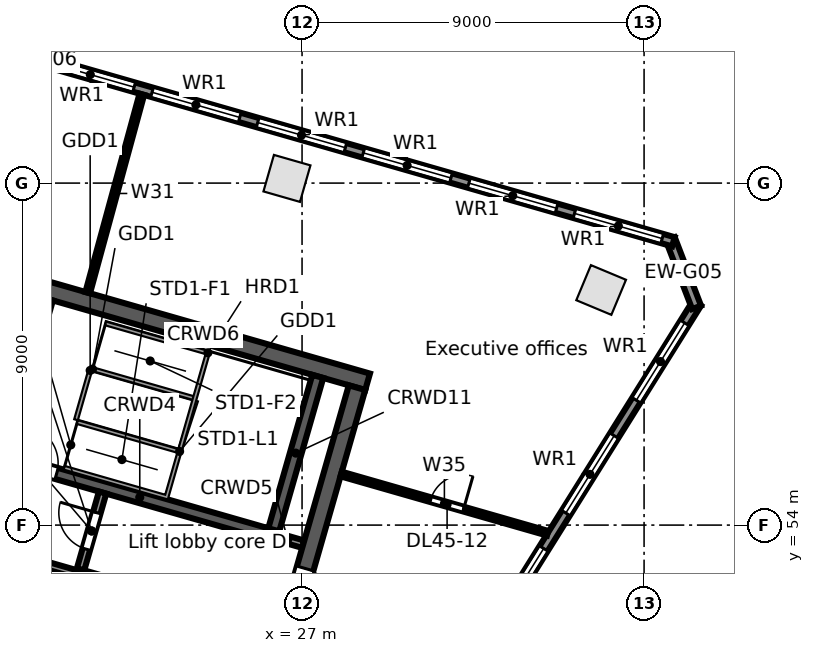
"""IFC4 building model, lengths in metres.
Left out: names, types, materials, properties, quantities, classifications, styles, units other than length and angle.
Written with IfcOpenShell. Run it as: python <this file> out.ifc"""

import sys

from ifc_helpers import new_model, si_unit, direction, frame, frame_2d, origin, origin_2d, place, context, subcontext, project, spatial, rectangle, extrude, element, fill, save


model = new_model("IFC4")
c1 = context("Model", 3, precision=1e-05, world=origin(), true_north=direction((0.0, 1.0)))
c2 = subcontext(c1, "Body", "Model", "MODEL_VIEW")
j1 = project(units=[si_unit("LENGTHUNIT", "METRE"), si_unit("PLANEANGLEUNIT", "RADIAN")], contexts=[c1])
p1 = place(None, origin())
s1 = spatial("IfcSite", under=j1, at=p1, CompositionType="ELEMENT")
p2 = place(p1, origin())
s2 = spatial("IfcBuilding", under=s1, at=p2, CompositionType="ELEMENT")
p3 = place(p2, frame((0.0, 0.0, 211.4)))
s3 = spatial("IfcBuildingStorey", under=s2, at=p3, CompositionType="ELEMENT", Elevation=211.4)
for number, where, z_axis, x_axis in (
    (1, (26.603, 63.124, 0.0), (0.0, 0.0, 1.0), (-0.961, 0.276, 0.0)),
    (2, (34.87, 60.187, 0.0), (0.0, 0.0, 1.0), (-0.923, 0.385, 0.0)),
):
    element("IfcColumn", number, at=place(p3, frame(where, z_axis=z_axis, x_axis=x_axis)), inside=s3, PredefinedType="COLUMN", context=c2, shape_type="SweptSolid", body=[
        extrude(rectangle(XDim=1.0, YDim=1.0, at=origin_2d()), origin(), (0.0, 0.0, 1.0), 3.9),
    ])
p4 = place(p3, frame((37.392, 59.84, 0.0), z_axis=(0.0, 0.0, 1.0), x_axis=(-0.529919909431, -0.848047692992, 0.0)))
e3 = element("IfcWall", 3, at=p4, inside=s3, PredefinedType="STANDARD", context=c2, shape_type="SweptSolid", body=[
    extrude(rectangle(XDim=21.104, YDim=0.25, at=frame_2d((10.552, 0.0))), origin(), (0.0, 0.0, 1.0), 3.62),
])
p5 = place(p4, frame((18.112, 0.0, 0.8)))
e4 = element("IfcOpeningElement", 4, at=p5, cuts=e3, PredefinedType="OPENING", context=c2, shape_type="SweptSolid", body=[
    extrude(rectangle(XDim=2.4, YDim=2.2, at=frame_2d((1.2, 1.1))), frame((0.0, 0.135, 0.0), z_axis=(0.0, -1.0, 0.0), x_axis=(1.0, 0.0, 0.0)), (0.0, 0.0, 1.0), 0.27),
])
p6 = place(p4, frame((14.612, 0.0, 0.8)))
e5 = element("IfcOpeningElement", 5, at=p6, cuts=e3, PredefinedType="OPENING", context=c2, shape_type="SweptSolid", body=[
    extrude(rectangle(XDim=2.4, YDim=2.2, at=frame_2d((1.2, 1.1))), frame((0.0, 0.135, 0.0), z_axis=(0.0, -1.0, 0.0), x_axis=(1.0, 0.0, 0.0)), (0.0, 0.0, 1.0), 0.27),
])
p7 = place(p4, frame((11.112, 0.0, 0.8)))
e6 = element("IfcOpeningElement", 6, at=p7, cuts=e3, PredefinedType="OPENING", context=c2, shape_type="SweptSolid", body=[
    extrude(rectangle(XDim=2.4, YDim=2.2, at=frame_2d((1.2, 1.1))), frame((0.0, 0.135, 0.0), z_axis=(0.0, -1.0, 0.0), x_axis=(1.0, 0.0, 0.0)), (0.0, 0.0, 1.0), 0.27),
])
p8 = place(p4, frame((7.612, 0.0, 0.8)))
e7 = element("IfcOpeningElement", 7, at=p8, cuts=e3, PredefinedType="OPENING", context=c2, shape_type="SweptSolid", body=[
    extrude(rectangle(XDim=2.4, YDim=2.2, at=frame_2d((1.2, 1.1))), frame((0.0, 0.135, 0.0), z_axis=(0.0, -1.0, 0.0), x_axis=(1.0, 0.0, 0.0)), (0.0, 0.0, 1.0), 0.27),
])
p9 = place(p4, frame((4.112, 0.0, 0.8)))
e8 = element("IfcOpeningElement", 8, at=p9, cuts=e3, PredefinedType="OPENING", context=c2, shape_type="SweptSolid", body=[
    extrude(rectangle(XDim=2.4, YDim=2.2, at=frame_2d((1.2, 1.1))), frame((0.0, 0.135, 0.0), z_axis=(0.0, -1.0, 0.0), x_axis=(1.0, 0.0, 0.0)), (0.0, 0.0, 1.0), 0.27),
])
p10 = place(p4, frame((0.612, 0.0, 0.8)))
e9 = element("IfcOpeningElement", 9, at=p10, cuts=e3, PredefinedType="OPENING", context=c2, shape_type="SweptSolid", body=[
    extrude(rectangle(XDim=2.4, YDim=2.2, at=frame_2d((1.2, 1.1))), frame((0.0, 0.135, 0.0), z_axis=(0.0, -1.0, 0.0), x_axis=(1.0, 0.0, 0.0)), (0.0, 0.0, 1.0), 0.27),
])
p11 = place(p3, frame((36.69, 61.531, 0.0), z_axis=(0.0, 0.0, 1.0), x_axis=(0.358377147136, -0.933576895821, 0.0)))
e10 = element("IfcWall", 10, at=p11, inside=s3, PredefinedType="STANDARD", context=c2, shape_type="SweptSolid", body=[
    extrude(rectangle(XDim=1.93, YDim=0.25, at=frame_2d((0.965, 0.0))), origin(), (0.0, 0.0, 1.0), 3.62),
])
p12 = place(p3, frame((3.34, 71.042, 0.0), z_axis=(0.0, 0.0, 1.0), x_axis=(0.96126179431, -0.275637012753, 0.0)))
e11 = element("IfcWall", 11, at=p12, inside=s3, PredefinedType="STANDARD", context=c2, shape_type="SweptSolid", body=[
    extrude(rectangle(XDim=34.779, YDim=0.25, at=frame_2d((17.39, 0.0))), origin(), (0.0, 0.0, 1.0), 3.62),
])
p13 = place(p12, frame((32.071, 0.0, 0.8)))
e12 = element("IfcOpeningElement", 12, at=p13, cuts=e11, PredefinedType="OPENING", context=c2, shape_type="SweptSolid", body=[
    extrude(rectangle(XDim=2.4, YDim=2.2, at=frame_2d((1.2, 1.1))), frame((0.0, 0.135, 0.0), z_axis=(0.0, -1.0, 0.0), x_axis=(1.0, 0.0, 0.0)), (0.0, 0.0, 1.0), 0.27),
])
p14 = place(p12, frame((29.18, 0.0, 0.8)))
e13 = element("IfcOpeningElement", 13, at=p14, cuts=e11, PredefinedType="OPENING", context=c2, shape_type="SweptSolid", body=[
    extrude(rectangle(XDim=2.4, YDim=2.2, at=frame_2d((1.2, 1.1))), frame((0.0, 0.135, 0.0), z_axis=(0.0, -1.0, 0.0), x_axis=(1.0, 0.0, 0.0)), (0.0, 0.0, 1.0), 0.27),
])
p15 = place(p12, frame((26.289, 0.0, 0.8)))
e14 = element("IfcOpeningElement", 14, at=p15, cuts=e11, PredefinedType="OPENING", context=c2, shape_type="SweptSolid", body=[
    extrude(rectangle(XDim=2.4, YDim=2.2, at=frame_2d((1.2, 1.1))), frame((0.0, 0.135, 0.0), z_axis=(0.0, -1.0, 0.0), x_axis=(1.0, 0.0, 0.0)), (0.0, 0.0, 1.0), 0.27),
])
p16 = place(p12, frame((23.398, 0.0, 0.8)))
e15 = element("IfcOpeningElement", 15, at=p16, cuts=e11, PredefinedType="OPENING", context=c2, shape_type="SweptSolid", body=[
    extrude(rectangle(XDim=2.4, YDim=2.2, at=frame_2d((1.2, 1.1))), frame((0.0, 0.135, 0.0), z_axis=(0.0, -1.0, 0.0), x_axis=(1.0, 0.0, 0.0)), (0.0, 0.0, 1.0), 0.27),
])
p17 = place(p12, frame((20.508, 0.0, 0.8)))
e16 = element("IfcOpeningElement", 16, at=p17, cuts=e11, PredefinedType="OPENING", context=c2, shape_type="SweptSolid", body=[
    extrude(rectangle(XDim=2.4, YDim=2.2, at=frame_2d((1.2, 1.1))), frame((0.0, 0.135, 0.0), z_axis=(0.0, -1.0, 0.0), x_axis=(1.0, 0.0, 0.0)), (0.0, 0.0, 1.0), 0.27),
])
p18 = place(p12, frame((17.616, 0.0, 0.8)))
e17 = element("IfcOpeningElement", 17, at=p18, cuts=e11, PredefinedType="OPENING", context=c2, shape_type="SweptSolid", body=[
    extrude(rectangle(XDim=2.4, YDim=2.2, at=frame_2d((1.2, 1.1))), frame((0.0, 0.135, 0.0), z_axis=(0.0, -1.0, 0.0), x_axis=(1.0, 0.0, 0.0)), (0.0, 0.0, 1.0), 0.27),
])
p19 = place(p12, frame((14.726, 0.0, 0.8)))
e18 = element("IfcOpeningElement", 18, at=p19, cuts=e11, PredefinedType="OPENING", context=c2, shape_type="SweptSolid", body=[
    extrude(rectangle(XDim=2.4, YDim=2.2, at=frame_2d((1.2, 1.1))), frame((0.0, 0.135, 0.0), z_axis=(0.0, -1.0, 0.0), x_axis=(1.0, 0.0, 0.0)), (0.0, 0.0, 1.0), 0.27),
])
p20 = place(p12, frame((11.834, 0.0, 0.8)))
e19 = element("IfcOpeningElement", 19, at=p20, cuts=e11, PredefinedType="OPENING", context=c2, shape_type="SweptSolid", body=[
    extrude(rectangle(XDim=2.4, YDim=2.2, at=frame_2d((1.2, 1.1))), frame((0.0, 0.135, 0.0), z_axis=(0.0, -1.0, 0.0), x_axis=(1.0, 0.0, 0.0)), (0.0, 0.0, 1.0), 0.27),
])
p21 = place(p12, frame((8.944, 0.0, 0.8)))
e20 = element("IfcOpeningElement", 20, at=p21, cuts=e11, PredefinedType="OPENING", context=c2, shape_type="SweptSolid", body=[
    extrude(rectangle(XDim=2.4, YDim=2.2, at=frame_2d((1.2, 1.1))), frame((0.0, 0.135, 0.0), z_axis=(0.0, -1.0, 0.0), x_axis=(1.0, 0.0, 0.0)), (0.0, 0.0, 1.0), 0.27),
])
p22 = place(p12, frame((6.052, 0.0, 0.8)))
e21 = element("IfcOpeningElement", 21, at=p22, cuts=e11, PredefinedType="OPENING", context=c2, shape_type="SweptSolid", body=[
    extrude(rectangle(XDim=2.4, YDim=2.2, at=frame_2d((1.2, 1.1))), frame((0.0, 0.135, 0.0), z_axis=(0.0, -1.0, 0.0), x_axis=(1.0, 0.0, 0.0)), (0.0, 0.0, 1.0), 0.27),
])
p23 = place(p12, frame((3.162, 0.0, 0.8)))
e22 = element("IfcOpeningElement", 22, at=p23, cuts=e11, PredefinedType="OPENING", context=c2, shape_type="SweptSolid", body=[
    extrude(rectangle(XDim=2.4, YDim=2.2, at=frame_2d((1.2, 1.1))), frame((0.0, 0.135, 0.0), z_axis=(0.0, -1.0, 0.0), x_axis=(1.0, 0.0, 0.0)), (0.0, 0.0, 1.0), 0.27),
])
p24 = place(p12, frame((0.271, 0.0, 0.8)))
e23 = element("IfcOpeningElement", 23, at=p24, cuts=e11, PredefinedType="OPENING", context=c2, shape_type="SweptSolid", body=[
    extrude(rectangle(XDim=2.4, YDim=2.2, at=frame_2d((1.2, 1.1))), frame((0.0, 0.135, 0.0), z_axis=(0.0, -1.0, 0.0), x_axis=(1.0, 0.0, 0.0)), (0.0, 0.0, 1.0), 0.27),
])
p25 = place(p3, frame((18.583, 53.423, 0.0), z_axis=(0.0, 0.0, 1.0), x_axis=(0.961259287968, -0.275645753268, 0.0)))
e24 = element("IfcWall", 24, at=p25, inside=s3, PredefinedType="SOLIDWALL", context=c2, shape_type="SweptSolid", body=[
    extrude(rectangle(XDim=2.65, YDim=0.2, at=frame_2d((1.325, 0.0))), origin(), (0.0, 0.0, 1.0), 3.62),
])
p26 = place(p3, frame((21.131, 52.692, 0.0), z_axis=(0.0, 0.0, 1.0), x_axis=(0.961261488075, -0.275638080722, 0.0)))
e25 = element("IfcWall", 25, at=p26, inside=s3, PredefinedType="SOLIDWALL", context=c2, shape_type="SweptSolid", body=[
    extrude(rectangle(XDim=5.45, YDim=0.3, at=frame_2d((2.725, 0.0))), origin(), (0.0, 0.0, 1.0), 3.62),
])
p27 = place(p26, frame((2.35, 0.0, 0.0)))
e26 = element("IfcOpeningElement", 26, at=p27, cuts=e25, PredefinedType="OPENING", context=c2, shape_type="SweptSolid", body=[
    extrude(rectangle(XDim=0.9, YDim=2.1, at=frame_2d((0.45, 1.05))), frame((0.0, 0.16, 0.0), z_axis=(0.0, -1.0, 0.0), x_axis=(1.0, 0.0, 0.0)), (0.0, 0.0, 1.0), 0.32),
])
p28 = place(p3, frame((19.245, 55.73, 0.0), z_axis=(0.0, 0.0, 1.0), x_axis=(0.961263007877, -0.275632780503, 0.0)))
e27 = element("IfcWall", 27, at=p28, inside=s3, PredefinedType="SOLIDWALL", context=c2, shape_type="SweptSolid", body=[
    extrude(rectangle(XDim=7.25, YDim=0.3, at=frame_2d((3.625, 0.0))), origin(), (0.0, 0.0, 1.0), 3.62),
])
p29 = place(p28, frame((0.35, 0.0, 0.0)))
e28 = element("IfcOpeningElement", 28, at=p29, cuts=e27, PredefinedType="OPENING", context=c2, shape_type="SweptSolid", body=[
    extrude(rectangle(XDim=1.0, YDim=2.1, at=frame_2d((0.5, 1.05))), frame((0.0, 0.16, 0.0), z_axis=(0.0, -1.0, 0.0), x_axis=(1.0, 0.0, 0.0)), (0.0, 0.0, 1.0), 0.32),
])
p30 = place(p3, frame((26.214, 53.732, 0.0), z_axis=(0.0, 0.0, 1.0), x_axis=(0.961241665642, -0.275707200184, 0.0)))
e29 = element("IfcWall", 29, at=p30, inside=s3, PredefinedType="SOLIDWALL", context=c2, shape_type="SweptSolid", body=[
    extrude(rectangle(XDim=0.85, YDim=0.2, at=frame_2d((0.425, 0.0))), origin(), (0.0, 0.0, 1.0), 3.62),
])
p31 = place(p3, frame((20.073, 60.252, 0.0), z_axis=(0.0, 0.0, 1.0), x_axis=(0.96126248289, -0.275634611374, 0.0)))
e30 = element("IfcWall", 30, at=p31, inside=s3, PredefinedType="SOLIDWALL", context=c2, shape_type="SweptSolid", body=[
    extrude(rectangle(XDim=9.0, YDim=0.45, at=frame_2d((4.5, 0.0))), origin(), (0.0, 0.0, 1.0), 3.62),
])
p32 = place(p3, frame((17.168, 49.303, 0.0), z_axis=(0.0, 0.0, 1.0), x_axis=(0.275638974822, 0.961261231695, 0.0)))
e31 = element("IfcWall", 31, at=p32, inside=s3, PredefinedType="SOLIDWALL", context=c2, shape_type="SweptSolid", body=[
    extrude(rectangle(XDim=11.1, YDim=0.45, at=frame_2d((5.55, 0.0))), origin(), (0.0, 0.0, 1.0), 3.62),
])
p33 = place(p32, frame((4.95, 0.0, 0.0)))
e32 = element("IfcOpeningElement", 32, at=p33, cuts=e31, PredefinedType="OPENING", context=c2, shape_type="SweptSolid", body=[
    extrude(rectangle(XDim=1.2, YDim=2.1, at=frame_2d((0.6, 1.05))), frame((0.0, 0.235, 0.0), z_axis=(0.0, -1.0, 0.0), x_axis=(1.0, 0.0, 0.0)), (0.0, 0.0, 1.0), 0.47),
])
p34 = place(p3, frame((21.172, 52.837, 0.0), z_axis=(0.0, 0.0, 1.0), x_axis=(0.275657676022, 0.961255868981, 0.0)))
e33 = element("IfcWall", 33, at=p34, inside=s3, PredefinedType="PARTITIONING", context=c2, shape_type="SweptSolid", body=[
    extrude(rectangle(XDim=2.1, YDim=0.2, at=frame_2d((1.05, 0.0))), origin(), (0.0, 0.0, 1.0), 3.62),
])
p35 = place(p34, frame((0.55, 0.0, 0.0)))
e34 = element("IfcOpeningElement", 34, at=p35, cuts=e33, PredefinedType="OPENING", context=c2, shape_type="SweptSolid", body=[
    extrude(rectangle(XDim=1.0, YDim=2.1, at=frame_2d((0.5, 1.05))), frame((0.0, 0.11, 0.0), z_axis=(0.0, -1.0, 0.0), x_axis=(1.0, 0.0, 0.0)), (0.0, 0.0, 1.0), 0.22),
])
p36 = place(p3, frame((26.256, 53.876, 0.0), z_axis=(0.0, 0.0, 1.0), x_axis=(0.275588560745, 0.96127568636, 0.0)))
e35 = element("IfcWall", 35, at=p36, inside=s3, PredefinedType="SOLIDWALL", context=c2, shape_type="SweptSolid", body=[
    extrude(rectangle(XDim=4.2, YDim=0.3, at=frame_2d((2.1, 0.0))), origin(), (0.0, 0.0, 1.0), 3.62),
])
p37 = place(p3, frame((25.387, 46.947, 0.0), z_axis=(0.0, 0.0, 1.0), x_axis=(0.275638974822, 0.961261231695, 0.0)))
e36 = element("IfcWall", 36, at=p37, inside=s3, PredefinedType="SOLIDWALL", context=c2, shape_type="SweptSolid", body=[
    extrude(rectangle(XDim=11.1, YDim=0.45, at=frame_2d((5.55, 0.0))), origin(), (0.0, 0.0, 1.0), 3.62),
])
p38 = place(p37, frame((4.95, 0.0, 0.0)))
e37 = element("IfcOpeningElement", 37, at=p38, cuts=e36, PredefinedType="OPENING", context=c2, shape_type="SweptSolid", body=[
    extrude(rectangle(XDim=1.2, YDim=2.1, at=frame_2d((0.6, 1.05))), frame((0.0, 0.235, 0.0), z_axis=(0.0, -1.0, 0.0), x_axis=(1.0, 0.0, 0.0)), (0.0, 0.0, 1.0), 0.47),
])
p39 = place(p3, frame((21.36, 60.117, 0.0), z_axis=(0.0, 0.0, 1.0), x_axis=(0.263151767798, 0.964754449124, 0.0)))
e38 = element("IfcWall", 38, at=p39, inside=s3, PredefinedType="PARTITIONING", context=c2, shape_type="SweptSolid", body=[
    extrude(rectangle(XDim=5.411, YDim=0.125, at=frame_2d((2.705, 0.0))), origin(), (0.0, 0.0, 1.0), 3.0),
])
p40 = place(p3, frame((28.029, 55.344, 0.0), z_axis=(0.0, 0.0, 1.0), x_axis=(0.961249621014, -0.275679462603, 0.0)))
e39 = element("IfcWall", 39, at=p40, inside=s3, PredefinedType="PARTITIONING", context=c2, shape_type="SweptSolid", body=[
    extrude(rectangle(XDim=5.652, YDim=0.125, at=frame_2d((2.826, 0.0))), origin(), (0.0, 0.0, 1.0), 2.988),
])
p41 = place(p40, frame((2.45, 0.0, 0.0)))
e40 = element("IfcOpeningElement", 40, at=p41, cuts=e39, PredefinedType="OPENING", context=c2, shape_type="SweptSolid", body=[
    extrude(rectangle(XDim=0.9, YDim=2.1, at=frame_2d((0.45, 1.05))), frame((0.0, 0.073, 0.0), z_axis=(0.0, -1.0, 0.0), x_axis=(1.0, 0.0, 0.0)), (0.0, 0.0, 1.0), 0.145),
])
p42 = place(p8, origin())
e41 = element("IfcWindow", 41, at=p42, inside=s3, PartitioningType="SINGLE_PANEL", PredefinedType="WINDOW", context=c2, shape_type="SweptSolid", body=[
    extrude(rectangle(XDim=2.4, YDim=2.2, at=frame_2d((1.2, 1.1))), frame((0.0, 0.03, 0.0), z_axis=(0.0, -1.0, 0.0), x_axis=(1.0, 0.0, 0.0)), (0.0, 0.0, 1.0), 0.06),
])
fill(e7, e41)
p43 = place(p9, origin())
e42 = element("IfcWindow", 42, at=p43, inside=s3, PartitioningType="SINGLE_PANEL", PredefinedType="WINDOW", context=c2, shape_type="SweptSolid", body=[
    extrude(rectangle(XDim=2.4, YDim=2.2, at=frame_2d((1.2, 1.1))), frame((0.0, 0.03, 0.0), z_axis=(0.0, -1.0, 0.0), x_axis=(1.0, 0.0, 0.0)), (0.0, 0.0, 1.0), 0.06),
])
fill(e8, e42)
p44 = place(p10, origin())
e43 = element("IfcWindow", 43, at=p44, inside=s3, PartitioningType="SINGLE_PANEL", PredefinedType="WINDOW", context=c2, shape_type="SweptSolid", body=[
    extrude(rectangle(XDim=2.4, YDim=2.2, at=frame_2d((1.2, 1.1))), frame((0.0, 0.03, 0.0), z_axis=(0.0, -1.0, 0.0), x_axis=(1.0, 0.0, 0.0)), (0.0, 0.0, 1.0), 0.06),
])
fill(e9, e43)
p45 = place(p13, origin())
e44 = element("IfcWindow", 44, at=p45, inside=s3, PartitioningType="SINGLE_PANEL", PredefinedType="WINDOW", context=c2, shape_type="SweptSolid", body=[
    extrude(rectangle(XDim=2.4, YDim=2.2, at=frame_2d((1.2, 1.1))), frame((0.0, 0.03, 0.0), z_axis=(0.0, -1.0, 0.0), x_axis=(1.0, 0.0, 0.0)), (0.0, 0.0, 1.0), 0.06),
])
fill(e12, e44)
p46 = place(p14, origin())
e45 = element("IfcWindow", 45, at=p46, inside=s3, PartitioningType="SINGLE_PANEL", PredefinedType="WINDOW", context=c2, shape_type="SweptSolid", body=[
    extrude(rectangle(XDim=2.4, YDim=2.2, at=frame_2d((1.2, 1.1))), frame((0.0, 0.03, 0.0), z_axis=(0.0, -1.0, 0.0), x_axis=(1.0, 0.0, 0.0)), (0.0, 0.0, 1.0), 0.06),
])
fill(e13, e45)
p47 = place(p15, origin())
e46 = element("IfcWindow", 46, at=p47, inside=s3, PartitioningType="SINGLE_PANEL", PredefinedType="WINDOW", context=c2, shape_type="SweptSolid", body=[
    extrude(rectangle(XDim=2.4, YDim=2.2, at=frame_2d((1.2, 1.1))), frame((0.0, 0.03, 0.0), z_axis=(0.0, -1.0, 0.0), x_axis=(1.0, 0.0, 0.0)), (0.0, 0.0, 1.0), 0.06),
])
fill(e14, e46)
p48 = place(p16, origin())
e47 = element("IfcWindow", 47, at=p48, inside=s3, PartitioningType="SINGLE_PANEL", PredefinedType="WINDOW", context=c2, shape_type="SweptSolid", body=[
    extrude(rectangle(XDim=2.4, YDim=2.2, at=frame_2d((1.2, 1.1))), frame((0.0, 0.03, 0.0), z_axis=(0.0, -1.0, 0.0), x_axis=(1.0, 0.0, 0.0)), (0.0, 0.0, 1.0), 0.06),
])
fill(e15, e47)
p49 = place(p17, origin())
e48 = element("IfcWindow", 48, at=p49, inside=s3, PartitioningType="SINGLE_PANEL", PredefinedType="WINDOW", context=c2, shape_type="SweptSolid", body=[
    extrude(rectangle(XDim=2.4, YDim=2.2, at=frame_2d((1.2, 1.1))), frame((0.0, 0.03, 0.0), z_axis=(0.0, -1.0, 0.0), x_axis=(1.0, 0.0, 0.0)), (0.0, 0.0, 1.0), 0.06),
])
fill(e16, e48)
p50 = place(p18, origin())
e49 = element("IfcWindow", 49, at=p50, inside=s3, PartitioningType="SINGLE_PANEL", PredefinedType="WINDOW", context=c2, shape_type="SweptSolid", body=[
    extrude(rectangle(XDim=2.4, YDim=2.2, at=frame_2d((1.2, 1.1))), frame((0.0, 0.03, 0.0), z_axis=(0.0, -1.0, 0.0), x_axis=(1.0, 0.0, 0.0)), (0.0, 0.0, 1.0), 0.06),
])
fill(e17, e49)
p51 = place(p29, origin())
e50 = element("IfcDoor", 50, at=p51, inside=s3, OperationType="SINGLE_SWING_LEFT", PredefinedType="DOOR", context=c2, shape_type="SweptSolid", body=[
    extrude(rectangle(XDim=1.0, YDim=2.1, at=frame_2d((0.5, 1.05))), frame((0.0, 0.025, 0.0), z_axis=(0.0, -1.0, 0.0), x_axis=(1.0, 0.0, 0.0)), (0.0, 0.0, 1.0), 0.05),
])
fill(e28, e50)
p52 = place(p35, origin())
e51 = element("IfcDoor", 51, at=p52, inside=s3, OperationType="SINGLE_SWING_RIGHT", PredefinedType="DOOR", context=c2, shape_type="SweptSolid", body=[
    extrude(rectangle(XDim=1.0, YDim=2.1, at=frame_2d((0.5, 1.05))), frame((0.0, 0.025, 0.0), z_axis=(0.0, -1.0, 0.0), x_axis=(1.0, 0.0, 0.0)), (0.0, 0.0, 1.0), 0.05),
])
fill(e34, e51)
p53 = place(p38, frame((1.2, 0.0, 0.0), z_axis=(0.0, 0.0, 1.0), x_axis=(-1.0, 0.0, 0.0)))
e52 = element("IfcDoor", 52, at=p53, inside=s3, OperationType="SINGLE_SWING_RIGHT", PredefinedType="DOOR", context=c2, shape_type="SweptSolid", body=[
    extrude(rectangle(XDim=1.2, YDim=2.1, at=frame_2d((0.6, 1.05))), frame((0.0, 0.025, 0.0), z_axis=(0.0, -1.0, 0.0), x_axis=(1.0, 0.0, 0.0)), (0.0, 0.0, 1.0), 0.05),
])
fill(e37, e52)
p54 = place(p41, origin())
e53 = element("IfcDoor", 53, at=p54, inside=s3, OperationType="SINGLE_SWING_RIGHT", PredefinedType="DOOR", context=c2, shape_type="SweptSolid", body=[
    extrude(rectangle(XDim=0.9, YDim=2.1, at=frame_2d((0.45, 1.05))), frame((0.0, 0.025, 0.0), z_axis=(0.0, -1.0, 0.0), x_axis=(1.0, 0.0, 0.0)), (0.0, 0.0, 1.0), 0.05),
])
fill(e40, e53)
save(model, sys.argv[1])
